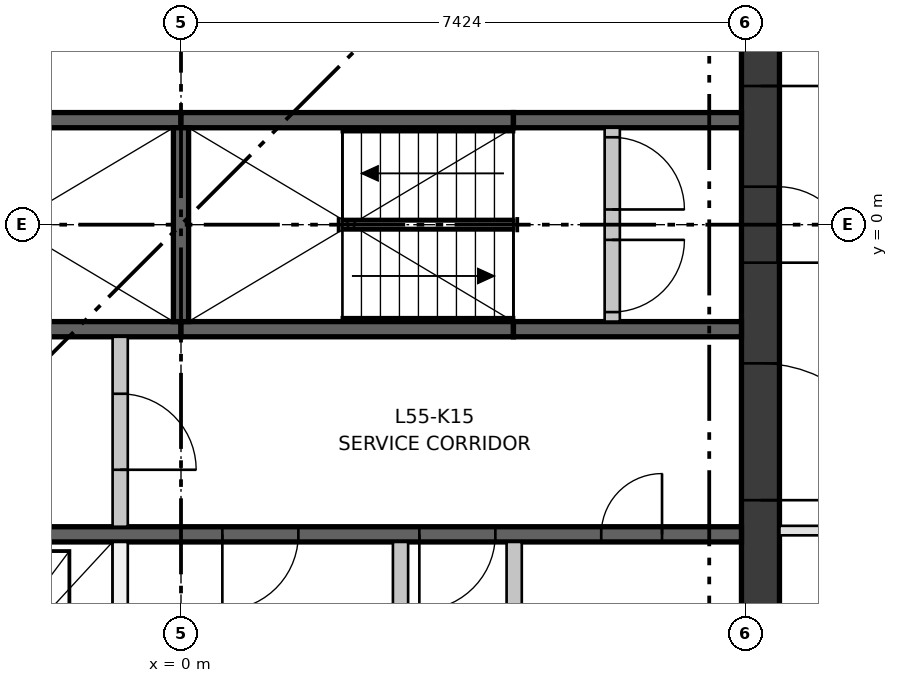
"""IFC4 building model, lengths in metres.
Left out: names, types, materials, properties, quantities, classifications, styles, units other than length and angle.
Written with IfcOpenShell. Run it as: python <this file> out.ifc"""

import sys

from ifc_helpers import new_model, si_unit, direction, frame, frame_2d, origin, place, context, subcontext, project, spatial, rectangle, extrude, element, fill, save


model = new_model("IFC4")
c1 = context("Model", 3, precision=1e-05, world=origin(), true_north=direction((0.0, 1.0)))
c2 = subcontext(c1, "Body", "Model", "MODEL_VIEW")
j1 = project(units=[si_unit("LENGTHUNIT", "METRE"), si_unit("PLANEANGLEUNIT", "RADIAN")], contexts=[c1])
p1 = place(None, origin())
s1 = spatial("IfcSite", under=j1, at=p1, CompositionType="ELEMENT")
p2 = place(p1, origin())
s2 = spatial("IfcBuilding", under=s1, at=p2, CompositionType="ELEMENT")
p3 = place(p2, frame((0.0, 0.0, 204.4)))
s3 = spatial("IfcBuildingStorey", under=s2, at=p3, CompositionType="ELEMENT", Elevation=204.4)
p4 = place(p3, frame((7.624, -7.374, 0.0), z_axis=(0.0, 0.0, 1.0), x_axis=(0.0, 1.0, 0.0)))
e1 = element("IfcWall", 1, at=p4, inside=s3, PredefinedType="SHEAR", context=c2, shape_type="SweptSolid", body=[
    extrude(rectangle(XDim=14.748, YDim=0.5, at=frame_2d((7.374, 0.0))), origin(), (0.0, 0.0, 1.0), 3.35),
])
p5 = place(p4, frame((6.874, 0.0, 0.0)))
e2 = element("IfcOpeningElement", 2, at=p5, cuts=e1, PredefinedType="OPENING", context=c2, shape_type="SweptSolid", body=[
    extrude(rectangle(XDim=1.0, YDim=2.1, at=frame_2d((0.5, 1.05))), frame((0.0, 0.26, 0.0), z_axis=(0.0, -1.0, 0.0), x_axis=(1.0, 0.0, 0.0)), (0.0, 0.0, 1.0), 0.52),
])
p6 = place(p4, frame((3.75, 0.0, 0.0)))
e3 = element("IfcOpeningElement", 3, at=p6, cuts=e1, PredefinedType="OPENING", context=c2, shape_type="SweptSolid", body=[
    extrude(rectangle(XDim=1.8, YDim=2.1, at=frame_2d((0.9, 1.05))), frame((0.0, 0.26, 0.0), z_axis=(0.0, -1.0, 0.0), x_axis=(1.0, 0.0, 0.0)), (0.0, 0.0, 1.0), 0.52),
])
p7 = place(p4, frame((9.198, 0.0, 0.0)))
e4 = element("IfcOpeningElement", 4, at=p7, cuts=e1, PredefinedType="OPENING", context=c2, shape_type="SweptSolid", body=[
    extrude(rectangle(XDim=1.8, YDim=2.1, at=frame_2d((0.9, 1.05))), frame((0.0, 0.26, 0.0), z_axis=(0.0, -1.0, 0.0), x_axis=(1.0, 0.0, 0.0)), (0.0, 0.0, 1.0), 0.52),
])
p8 = place(p3, frame((-7.374, -4.074, 0.0), z_axis=(0.0, 0.0, 1.0), x_axis=(1.0, 0.0, 0.0)))
e5 = element("IfcWall", 5, at=p8, inside=s3, PredefinedType="SHEAR", context=c2, shape_type="SweptSolid", body=[
    extrude(rectangle(XDim=14.748, YDim=0.2, at=frame_2d((7.374, 0.0))), origin(), (0.0, 0.0, 1.0), 3.0),
])
p9 = place(p8, frame((1.319, 0.0, 0.0)))
e6 = element("IfcOpeningElement", 6, at=p9, cuts=e5, PredefinedType="OPENING", context=c2, shape_type="SweptSolid", body=[
    extrude(rectangle(XDim=1.1, YDim=2.1, at=frame_2d((0.55, 1.05))), frame((0.0, 0.11, 0.0), z_axis=(0.0, -1.0, 0.0), x_axis=(1.0, 0.0, 0.0)), (0.0, 0.0, 1.0), 0.22),
])
p10 = place(p8, frame((4.456, 0.0, 0.0)))
e7 = element("IfcOpeningElement", 7, at=p10, cuts=e5, PredefinedType="OPENING", context=c2, shape_type="SweptSolid", body=[
    extrude(rectangle(XDim=1.1, YDim=2.1, at=frame_2d((0.55, 1.05))), frame((0.0, 0.11, 0.0), z_axis=(0.0, -1.0, 0.0), x_axis=(1.0, 0.0, 0.0)), (0.0, 0.0, 1.0), 0.22),
])
p11 = place(p8, frame((7.918, 0.0, 0.0)))
e8 = element("IfcOpeningElement", 8, at=p11, cuts=e5, PredefinedType="OPENING", context=c2, shape_type="SweptSolid", body=[
    extrude(rectangle(XDim=1.0, YDim=2.1, at=frame_2d((0.5, 1.05))), frame((0.0, 0.11, 0.0), z_axis=(0.0, -1.0, 0.0), x_axis=(1.0, 0.0, 0.0)), (0.0, 0.0, 1.0), 0.22),
])
p12 = place(p8, frame((10.51, 0.0, 0.0)))
e9 = element("IfcOpeningElement", 9, at=p12, cuts=e5, PredefinedType="OPENING", context=c2, shape_type="SweptSolid", body=[
    extrude(rectangle(XDim=1.0, YDim=2.1, at=frame_2d((0.5, 1.05))), frame((0.0, 0.11, 0.0), z_axis=(0.0, -1.0, 0.0), x_axis=(1.0, 0.0, 0.0)), (0.0, 0.0, 1.0), 0.22),
])
p13 = place(p8, frame((12.903, 0.0, 0.0)))
e10 = element("IfcOpeningElement", 10, at=p13, cuts=e5, PredefinedType="OPENING", context=c2, shape_type="SweptSolid", body=[
    extrude(rectangle(XDim=0.8, YDim=2.1, at=frame_2d((0.4, 1.05))), frame((0.0, 0.11, 0.0), z_axis=(0.0, -1.0, 0.0), x_axis=(1.0, 0.0, 0.0)), (0.0, 0.0, 1.0), 0.22),
])
for number, where, z_axis, x_axis in (
    (11, (-4.374, -1.375, 0.0), (0.0, 0.0, 1.0), (1.0, 0.0, 0.0)),
    (12, (0.0, -1.375, 0.0), (0.0, 0.0, 1.0), (1.0, 0.0, 0.0)),
):
    element("IfcWall", number, at=place(p3, frame(where, z_axis=z_axis, x_axis=x_axis)), inside=s3, PredefinedType="SHEAR", context=c2, shape_type="SweptSolid", body=[
        extrude(rectangle(XDim=4.374, YDim=0.2, at=frame_2d((2.187, 0.0))), origin(), (0.0, 0.0, 1.0), 3.0),
    ])
p14 = place(p3, frame((4.374, -1.375, 0.0), z_axis=(0.0, 0.0, 1.0), x_axis=(1.0, 0.0, 0.0)))
e13 = element("IfcWall", 13, at=p14, inside=s3, PredefinedType="SHEAR", context=c2, shape_type="SweptSolid", body=[
    extrude(rectangle(XDim=3.0, YDim=0.2, at=frame_2d((1.5, 0.0))), origin(), (0.0, 0.0, 1.0), 3.0),
])
for number, where, z_axis, x_axis in (
    (14, (-4.374, 1.375, 0.0), (0.0, 0.0, 1.0), (1.0, 0.0, 0.0)),
    (15, (0.0, 1.375, 0.0), (0.0, 0.0, 1.0), (1.0, 0.0, 0.0)),
):
    element("IfcWall", number, at=place(p3, frame(where, z_axis=z_axis, x_axis=x_axis)), inside=s3, PredefinedType="SHEAR", context=c2, shape_type="SweptSolid", body=[
        extrude(rectangle(XDim=4.374, YDim=0.2, at=frame_2d((2.187, 0.0))), origin(), (0.0, 0.0, 1.0), 3.0),
    ])
p15 = place(p3, frame((4.374, 1.375, 0.0), z_axis=(0.0, 0.0, 1.0), x_axis=(1.0, 0.0, 0.0)))
e16 = element("IfcWall", 16, at=p15, inside=s3, PredefinedType="SHEAR", context=c2, shape_type="SweptSolid", body=[
    extrude(rectangle(XDim=3.0, YDim=0.2, at=frame_2d((1.5, 0.0))), origin(), (0.0, 0.0, 1.0), 3.0),
])
p16 = place(p3, frame((0.0, -1.275, 0.0), z_axis=(0.0, 0.0, 1.0), x_axis=(0.0, 1.0, 0.0)))
e17 = element("IfcWall", 17, at=p16, inside=s3, PredefinedType="SHEAR", context=c2, shape_type="SweptSolid", body=[
    extrude(rectangle(XDim=2.55, YDim=0.2, at=frame_2d((1.275, 0.0))), origin(), (0.0, 0.0, 1.0), 3.0),
])
p17 = place(p3, frame((-0.8, -7.374, 0.0), z_axis=(0.0, 0.0, 1.0), x_axis=(0.0, 1.0, 0.0)))
e18 = element("IfcWall", 18, at=p17, inside=s3, PredefinedType="PARTITIONING", context=c2, shape_type="SweptSolid", body=[
    extrude(rectangle(XDim=3.2, YDim=0.2, at=frame_2d((1.6, 0.0))), origin(), (0.0, 0.0, 1.0), 3.0),
])
p18 = place(p3, frame((-0.8, -3.974, 0.0), z_axis=(0.0, 0.0, 1.0), x_axis=(0.0, 1.0, 0.0)))
e19 = element("IfcWall", 19, at=p18, inside=s3, PredefinedType="PARTITIONING", context=c2, shape_type="SweptSolid", body=[
    extrude(rectangle(XDim=2.499, YDim=0.2, at=frame_2d((1.25, 0.0))), origin(), (0.0, 0.0, 1.0), 3.0),
])
p19 = place(p18, frame((0.75, 0.0, 0.0)))
e20 = element("IfcOpeningElement", 20, at=p19, cuts=e19, PredefinedType="OPENING", context=c2, shape_type="SweptSolid", body=[
    extrude(rectangle(XDim=1.0, YDim=2.1, at=frame_2d((0.5, 1.05))), frame((0.0, 0.11, 0.0), z_axis=(0.0, -1.0, 0.0), x_axis=(1.0, 0.0, 0.0)), (0.0, 0.0, 1.0), 0.22),
])
for number, where, z_axis, x_axis in (
    (21, (2.888, -7.374, 0.0), (0.0, 0.0, 1.0), (0.0, 1.0, 0.0)),
    (22, (4.384, -7.374, 0.0), (0.0, 0.0, 1.0), (0.0, 1.0, 0.0)),
):
    element("IfcWall", number, at=place(p3, frame(where, z_axis=z_axis, x_axis=x_axis)), inside=s3, PredefinedType="PARTITIONING", context=c2, shape_type="SweptSolid", body=[
        extrude(rectangle(XDim=3.2, YDim=0.2, at=frame_2d((1.6, 0.0))), origin(), (0.0, 0.0, 1.0), 3.0),
    ])
p20 = place(p3, frame((5.674, -1.275, 0.0), z_axis=(0.0, 0.0, 1.0), x_axis=(0.0, 1.0, 0.0)))
e23 = element("IfcWall", 23, at=p20, inside=s3, PredefinedType="PARTITIONING", context=c2, shape_type="SweptSolid", body=[
    extrude(rectangle(XDim=2.55, YDim=0.2, at=frame_2d((1.275, 0.0))), origin(), (0.0, 0.0, 1.0), 3.0),
])
p21 = place(p20, frame((0.125, 0.0, 0.0)))
e24 = element("IfcOpeningElement", 24, at=p21, cuts=e23, PredefinedType="OPENING", context=c2, shape_type="SweptSolid", body=[
    extrude(rectangle(XDim=0.95, YDim=2.1, at=frame_2d((0.475, 1.05))), frame((0.0, 0.11, 0.0), z_axis=(0.0, -1.0, 0.0), x_axis=(1.0, 0.0, 0.0)), (0.0, 0.0, 1.0), 0.22),
])
p22 = place(p20, frame((1.475, 0.0, 0.0)))
e25 = element("IfcOpeningElement", 25, at=p22, cuts=e23, PredefinedType="OPENING", context=c2, shape_type="SweptSolid", body=[
    extrude(rectangle(XDim=0.95, YDim=2.1, at=frame_2d((0.475, 1.05))), frame((0.0, 0.11, 0.0), z_axis=(0.0, -1.0, 0.0), x_axis=(1.0, 0.0, 0.0)), (0.0, 0.0, 1.0), 0.22),
])
p23 = place(p3, frame((12.404, -4.024, 0.0), z_axis=(0.0, 0.0, 1.0), x_axis=(-1.0, 0.0, 0.0)))
e26 = element("IfcWall", 26, at=p23, inside=s3, PredefinedType="PARTITIONING", context=c2, shape_type="SweptSolid", body=[
    extrude(rectangle(XDim=4.53, YDim=0.125, at=frame_2d((2.265, 0.0))), origin(), (0.0, 0.0, 1.0), 3.0),
])
p24 = place(p23, frame((1.8, 0.0, 0.0)))
e27 = element("IfcOpeningElement", 27, at=p24, cuts=e26, PredefinedType="OPENING", context=c2, shape_type="SweptSolid", body=[
    extrude(rectangle(XDim=1.0, YDim=2.1, at=frame_2d((0.5, 1.05))), frame((0.0, 0.073, 0.0), z_axis=(0.0, -1.0, 0.0), x_axis=(1.0, 0.0, 0.0)), (0.0, 0.0, 1.0), 0.145),
])
p25 = place(p21, frame((0.95, 0.0, 0.0), z_axis=(0.0, 0.0, 1.0), x_axis=(-1.0, 0.0, 0.0)))
e28 = element("IfcDoor", 28, at=p25, inside=s3, OperationType="SINGLE_SWING_RIGHT", PredefinedType="DOOR", context=c2, shape_type="SweptSolid", body=[
    extrude(rectangle(XDim=0.95, YDim=2.1, at=frame_2d((0.475, 1.05))), frame((0.0, 0.025, 0.0), z_axis=(0.0, -1.0, 0.0), x_axis=(1.0, 0.0, 0.0)), (0.0, 0.0, 1.0), 0.05),
])
fill(e24, e28)
p26 = place(p22, frame((0.95, 0.0, 0.0), z_axis=(0.0, 0.0, 1.0), x_axis=(-1.0, 0.0, 0.0)))
e29 = element("IfcDoor", 29, at=p26, inside=s3, OperationType="SINGLE_SWING_LEFT", PredefinedType="DOOR", context=c2, shape_type="SweptSolid", body=[
    extrude(rectangle(XDim=0.95, YDim=2.1, at=frame_2d((0.475, 1.05))), frame((0.0, 0.025, 0.0), z_axis=(0.0, -1.0, 0.0), x_axis=(1.0, 0.0, 0.0)), (0.0, 0.0, 1.0), 0.05),
])
fill(e25, e29)
p27 = place(p19, frame((1.0, 0.0, 0.0), z_axis=(0.0, 0.0, 1.0), x_axis=(-1.0, 0.0, 0.0)))
e30 = element("IfcDoor", 30, at=p27, inside=s3, OperationType="SINGLE_SWING_LEFT", PredefinedType="DOOR", context=c2, shape_type="SweptSolid", body=[
    extrude(rectangle(XDim=1.0, YDim=2.1, at=frame_2d((0.5, 1.05))), frame((0.0, 0.025, 0.0), z_axis=(0.0, -1.0, 0.0), x_axis=(1.0, 0.0, 0.0)), (0.0, 0.0, 1.0), 0.05),
])
fill(e20, e30)
p28 = place(p11, frame((1.0, 0.0, 0.0), z_axis=(0.0, 0.0, 1.0), x_axis=(-1.0, 0.0, 0.0)))
e31 = element("IfcDoor", 31, at=p28, inside=s3, OperationType="SINGLE_SWING_LEFT", PredefinedType="DOOR", context=c2, shape_type="SweptSolid", body=[
    extrude(rectangle(XDim=1.0, YDim=2.1, at=frame_2d((0.5, 1.05))), frame((0.0, 0.025, 0.0), z_axis=(0.0, -1.0, 0.0), x_axis=(1.0, 0.0, 0.0)), (0.0, 0.0, 1.0), 0.05),
])
fill(e8, e31)
p29 = place(p12, frame((1.0, 0.0, 0.0), z_axis=(0.0, 0.0, 1.0), x_axis=(-1.0, 0.0, 0.0)))
e32 = element("IfcDoor", 32, at=p29, inside=s3, OperationType="SINGLE_SWING_LEFT", PredefinedType="DOOR", context=c2, shape_type="SweptSolid", body=[
    extrude(rectangle(XDim=1.0, YDim=2.1, at=frame_2d((0.5, 1.05))), frame((0.0, 0.025, 0.0), z_axis=(0.0, -1.0, 0.0), x_axis=(1.0, 0.0, 0.0)), (0.0, 0.0, 1.0), 0.05),
])
fill(e9, e32)
p30 = place(p13, origin())
e33 = element("IfcDoor", 33, at=p30, inside=s3, OperationType="SINGLE_SWING_RIGHT", PredefinedType="DOOR", context=c2, shape_type="SweptSolid", body=[
    extrude(rectangle(XDim=0.8, YDim=2.1, at=frame_2d((0.4, 1.05))), frame((0.0, 0.025, 0.0), z_axis=(0.0, -1.0, 0.0), x_axis=(1.0, 0.0, 0.0)), (0.0, 0.0, 1.0), 0.05),
])
fill(e10, e33)
p31 = place(p5, frame((1.0, 0.0, 0.0), z_axis=(0.0, 0.0, 1.0), x_axis=(-1.0, 0.0, 0.0)))
e34 = element("IfcDoor", 34, at=p31, inside=s3, OperationType="SINGLE_SWING_LEFT", PredefinedType="DOOR", context=c2, shape_type="SweptSolid", body=[
    extrude(rectangle(XDim=1.0, YDim=2.1, at=frame_2d((0.5, 1.05))), frame((0.0, 0.25, 0.0), z_axis=(0.0, -1.0, 0.0), x_axis=(1.0, 0.0, 0.0)), (0.0, 0.0, 1.0), 0.05),
])
fill(e2, e34)
p32 = place(p6, frame((1.8, 0.0, 0.0), z_axis=(0.0, 0.0, 1.0), x_axis=(-1.0, 0.0, 0.0)))
e35 = element("IfcDoor", 35, at=p32, inside=s3, OperationType="DOUBLE_DOOR_SINGLE_SWING", PredefinedType="DOOR", context=c2, shape_type="SweptSolid", body=[
    extrude(rectangle(XDim=1.8, YDim=2.1, at=frame_2d((0.9, 1.05))), frame((0.0, 0.025, 0.0), z_axis=(0.0, -1.0, 0.0), x_axis=(1.0, 0.0, 0.0)), (0.0, 0.0, 1.0), 0.05),
])
fill(e3, e35)
p33 = place(p7, frame((1.8, 0.0, 0.0), z_axis=(0.0, 0.0, 1.0), x_axis=(-1.0, 0.0, 0.0)))
e36 = element("IfcDoor", 36, at=p33, inside=s3, OperationType="DOUBLE_DOOR_SINGLE_SWING", PredefinedType="DOOR", context=c2, shape_type="SweptSolid", body=[
    extrude(rectangle(XDim=1.8, YDim=2.1, at=frame_2d((0.9, 1.05))), frame((0.0, 0.025, 0.0), z_axis=(0.0, -1.0, 0.0), x_axis=(1.0, 0.0, 0.0)), (0.0, 0.0, 1.0), 0.05),
])
fill(e4, e36)
save(model, sys.argv[1])
